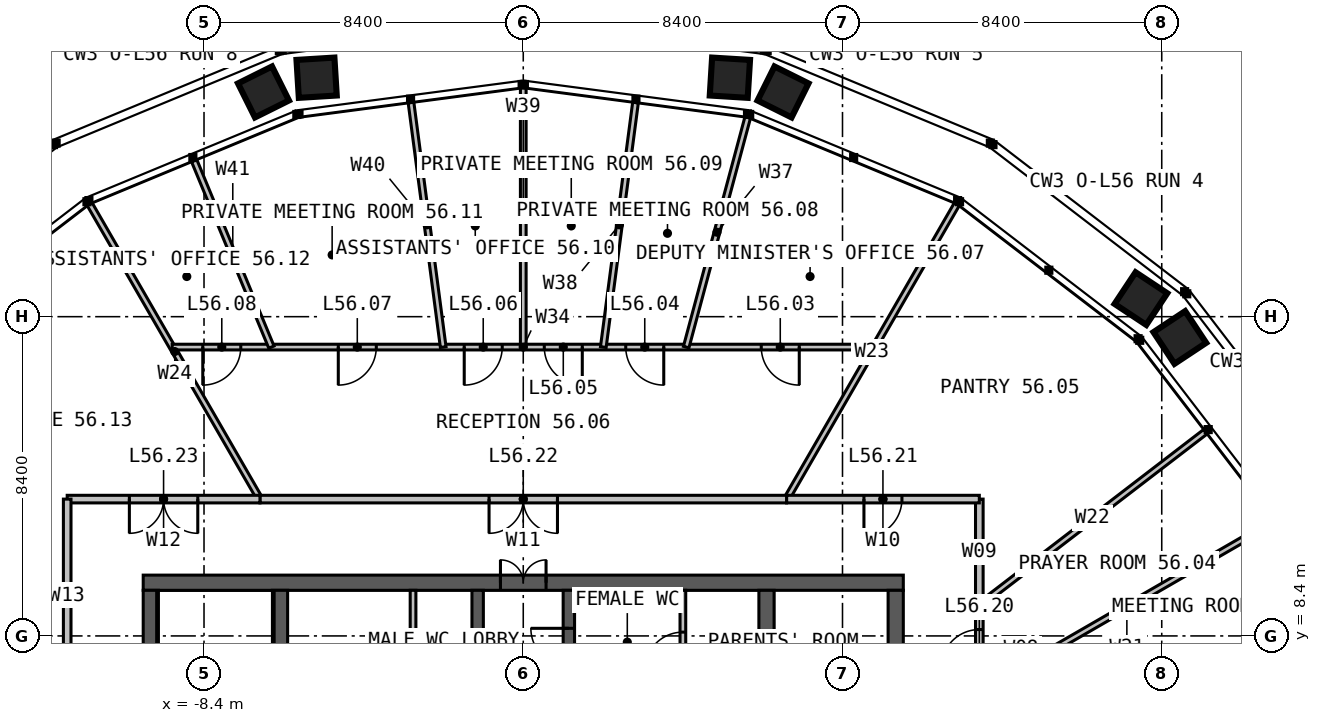
"""IFC4 building model, lengths in metres.
Left out: names, types, materials, properties, quantities, classifications, styles, units other than length and angle.
Written with IfcOpenShell. Run it as: python <this file> out.ifc"""

import sys

from ifc_helpers import new_model, si_unit, direction, frame, frame_2d, origin, place, context, subcontext, project, spatial, rectangle, extrude, element, fill, save


model = new_model("IFC4")
c1 = context("Model", 3, precision=1e-05, world=origin(), true_north=direction((0.0, 1.0)))
c2 = subcontext(c1, "Body", "Model", "MODEL_VIEW")
j1 = project(units=[si_unit("LENGTHUNIT", "METRE"), si_unit("PLANEANGLEUNIT", "RADIAN")], contexts=[c1])
p1 = place(None, origin())
s1 = spatial("IfcSite", under=j1, at=p1, CompositionType="ELEMENT")
p2 = place(p1, origin())
s2 = spatial("IfcBuilding", under=s1, at=p2, CompositionType="ELEMENT")
p3 = place(p2, frame((0.0, 0.0, 232.0)))
s3 = spatial("IfcBuildingStorey", under=s2, at=p3, CompositionType="ELEMENT", Elevation=232.0)
p4 = place(p3, frame((-10.0, 9.8, 0.0), z_axis=(0.0, 0.0, 1.0), x_axis=(1.0, 0.0, 0.0)))
e1 = element("IfcWall", 1, at=p4, inside=s3, PredefinedType="SOLIDWALL", context=c2, shape_type="SweptSolid", body=[
    extrude(rectangle(XDim=20.0, YDim=0.4, at=frame_2d((10.0, 0.0))), origin(), (0.0, 0.0, 1.0), 4.0),
])
p5 = place(p4, frame((9.4, 0.0, 0.0)))
e2 = element("IfcOpeningElement", 2, at=p5, cuts=e1, PredefinedType="OPENING", context=c2, shape_type="SweptSolid", body=[
    extrude(rectangle(XDim=1.2, YDim=2.2, at=frame_2d((0.6, 1.1))), frame((0.0, 0.21, 0.0), z_axis=(0.0, -1.0, 0.0), x_axis=(1.0, 0.0, 0.0)), (0.0, 0.0, 1.0), 0.42),
])
for number, where, z_axis, x_axis in (
    (3, (9.8, -9.6, 0.0), (0.0, 0.0, 1.0), (0.0, 1.0, 0.0)),
    (4, (-9.8, 9.6, 0.0), (0.0, 0.0, 1.0), (0.0, -1.0, 0.0)),
):
    element("IfcWall", number, at=place(p3, frame(where, z_axis=z_axis, x_axis=x_axis)), inside=s3, PredefinedType="SOLIDWALL", context=c2, shape_type="SweptSolid", body=[
        extrude(rectangle(XDim=19.2, YDim=0.4, at=frame_2d((9.6, 0.0))), origin(), (0.0, 0.0, 1.0), 4.0),
    ])
p6 = place(p3, frame((-6.4, -9.6, 0.0), z_axis=(0.0, 0.0, 1.0), x_axis=(0.0, 1.0, 0.0)))
e5 = element("IfcWall", 5, at=p6, inside=s3, PredefinedType="SOLIDWALL", context=c2, shape_type="SweptSolid", body=[
    extrude(rectangle(XDim=19.2, YDim=0.4, at=frame_2d((9.6, 0.0))), origin(), (0.0, 0.0, 1.0), 4.0),
])
p7 = place(p6, frame((9.1, 0.0, 0.0)))
e6 = element("IfcOpeningElement", 6, at=p7, cuts=e5, PredefinedType="OPENING", context=c2, shape_type="SweptSolid", body=[
    extrude(rectangle(XDim=1.0, YDim=2.2, at=frame_2d((0.5, 1.1))), frame((0.0, 0.21, 0.0), z_axis=(0.0, -1.0, 0.0), x_axis=(1.0, 0.0, 0.0)), (0.0, 0.0, 1.0), 0.42),
])
p8 = place(p3, frame((6.4, 9.6, 0.0), z_axis=(0.0, 0.0, 1.0), x_axis=(0.0, -1.0, 0.0)))
e7 = element("IfcWall", 7, at=p8, inside=s3, PredefinedType="SOLIDWALL", context=c2, shape_type="SweptSolid", body=[
    extrude(rectangle(XDim=19.2, YDim=0.4, at=frame_2d((9.6, 0.0))), origin(), (0.0, 0.0, 1.0), 4.0),
])
p9 = place(p8, frame((9.1, 0.0, 0.0)))
e8 = element("IfcOpeningElement", 8, at=p9, cuts=e7, PredefinedType="OPENING", context=c2, shape_type="SweptSolid", body=[
    extrude(rectangle(XDim=1.0, YDim=2.2, at=frame_2d((0.5, 1.1))), frame((0.0, 0.21, 0.0), z_axis=(0.0, -1.0, 0.0), x_axis=(1.0, 0.0, 0.0)), (0.0, 0.0, 1.0), 0.42),
])
p10 = place(p3, frame((-1.2, 1.45, 0.0), z_axis=(0.0, 0.0, 1.0), x_axis=(0.0, 1.0, 0.0)))
e9 = element("IfcWall", 9, at=p10, inside=s3, PredefinedType="SOLIDWALL", context=c2, shape_type="SweptSolid", body=[
    extrude(rectangle(XDim=8.15, YDim=0.3, at=frame_2d((4.075, 0.0))), origin(), (0.0, 0.0, 1.0), 4.0),
])
p11 = place(p10, frame((5.05, 0.0, 0.0)))
e10 = element("IfcOpeningElement", 10, at=p11, cuts=e9, PredefinedType="OPENING", context=c2, shape_type="SweptSolid", body=[
    extrude(rectangle(XDim=1.0, YDim=2.2, at=frame_2d((0.5, 1.1))), frame((0.0, 0.16, 0.0), z_axis=(0.0, -1.0, 0.0), x_axis=(1.0, 0.0, 0.0)), (0.0, 0.0, 1.0), 0.32),
])
p12 = place(p3, frame((1.2, 1.45, 0.0), z_axis=(0.0, 0.0, 1.0), x_axis=(0.0, 1.0, 0.0)))
e11 = element("IfcWall", 11, at=p12, inside=s3, PredefinedType="SOLIDWALL", context=c2, shape_type="SweptSolid", body=[
    extrude(rectangle(XDim=8.15, YDim=0.3, at=frame_2d((4.075, 0.0))), origin(), (0.0, 0.0, 1.0), 4.0),
])
p13 = place(p12, frame((3.8, 0.0, 0.0)))
e12 = element("IfcOpeningElement", 12, at=p13, cuts=e11, PredefinedType="OPENING", context=c2, shape_type="SweptSolid", body=[
    extrude(rectangle(XDim=1.0, YDim=2.2, at=frame_2d((0.5, 1.1))), frame((0.0, 0.16, 0.0), z_axis=(0.0, -1.0, 0.0), x_axis=(1.0, 0.0, 0.0)), (0.0, 0.0, 1.0), 0.32),
])
p14 = place(p12, frame((6.15, 0.0, 0.0)))
e13 = element("IfcOpeningElement", 13, at=p14, cuts=e11, PredefinedType="OPENING", context=c2, shape_type="SweptSolid", body=[
    extrude(rectangle(XDim=1.0, YDim=2.2, at=frame_2d((0.5, 1.1))), frame((0.0, 0.16, 0.0), z_axis=(0.0, -1.0, 0.0), x_axis=(1.0, 0.0, 0.0)), (0.0, 0.0, 1.0), 0.32),
])
p15 = place(p3, frame((4.2, 6.875, 0.0), z_axis=(0.0, 0.0, 1.0), x_axis=(0.0, 1.0, 0.0)))
e14 = element("IfcWall", 14, at=p15, inside=s3, PredefinedType="PARTITIONING", context=c2, shape_type="SweptSolid", body=[
    extrude(rectangle(XDim=2.725, YDim=0.15, at=frame_2d((1.363, 0.0))), origin(), (0.0, 0.0, 1.0), 3.75),
])
p16 = place(p15, frame((0.625, 0.0, 0.0)))
e15 = element("IfcOpeningElement", 15, at=p16, cuts=e14, PredefinedType="OPENING", context=c2, shape_type="SweptSolid", body=[
    extrude(rectangle(XDim=1.0, YDim=2.2, at=frame_2d((0.5, 1.1))), frame((0.0, 0.085, 0.0), z_axis=(0.0, -1.0, 0.0), x_axis=(1.0, 0.0, 0.0)), (0.0, 0.0, 1.0), 0.17),
])
p17 = place(p3, frame((-2.9, 4.75, 0.0), z_axis=(0.0, 0.0, 1.0), x_axis=(0.0, 1.0, 0.0)))
e16 = element("IfcWall", 16, at=p17, inside=s3, PredefinedType="PARTITIONING", context=c2, shape_type="SweptSolid", body=[
    extrude(rectangle(XDim=4.85, YDim=0.15, at=frame_2d((2.425, 0.0))), origin(), (0.0, 0.0, 1.0), 3.75),
])
p18 = place(p17, frame((0.35, 0.0, 0.0)))
e17 = element("IfcOpeningElement", 17, at=p18, cuts=e16, PredefinedType="OPENING", context=c2, shape_type="SweptSolid", body=[
    extrude(rectangle(XDim=1.0, YDim=2.2, at=frame_2d((0.5, 1.1))), frame((0.0, 0.085, 0.0), z_axis=(0.0, -1.0, 0.0), x_axis=(1.0, 0.0, 0.0)), (0.0, 0.0, 1.0), 0.17),
])
p19 = place(p3, frame((12.0, 6.928, 0.0), z_axis=(0.0, 0.0, 1.0), x_axis=(0.866025969295, 0.499999020506, 0.0)))
e18 = element("IfcWall", 18, at=p19, inside=s3, PredefinedType="PARTITIONING", context=c2, shape_type="SweptSolid", body=[
    extrude(rectangle(XDim=8.966, YDim=0.15, at=frame_2d((4.483, 0.0))), origin(), (0.0, 0.0, 1.0), 2.79),
])
p20 = place(p3, frame((12.0, 9.208, 0.0), z_axis=(0.0, 0.0, 1.0), x_axis=(0.793359040843, 0.608753999833, 0.0)))
e19 = element("IfcWall", 19, at=p20, inside=s3, PredefinedType="PARTITIONING", context=c2, shape_type="SweptSolid", body=[
    extrude(rectangle(XDim=7.501, YDim=0.15, at=frame_2d((3.75, 0.0))), origin(), (0.0, 0.0, 1.0), 2.79),
])
for number, where, z_axis, x_axis in (
    (20, (6.928, 12.0, 0.0), (0.0, 0.0, 1.0), (0.5, 0.866, 0.0)),
    (21, (-6.928, 12.0, 0.0), (0.0, 0.0, 1.0), (-0.5, 0.866, 0.0)),
    (22, (-12.0, 6.928, 0.0), (0.0, 0.0, 1.0), (-0.866, 0.5, 0.0)),
):
    element("IfcWall", number, at=place(p3, frame(where, z_axis=z_axis, x_axis=x_axis)), inside=s3, PredefinedType="PARTITIONING", context=c2, shape_type="SweptSolid", body=[
        extrude(rectangle(XDim=8.966, YDim=0.15, at=frame_2d((4.483, 0.0))), origin(), (0.0, 0.0, 1.0), 2.79),
    ])
p21 = place(p3, frame((12.0, 6.928, 0.0), z_axis=(0.0, 0.0, 1.0), x_axis=(0.0, 1.0, 0.0)))
e23 = element("IfcWall", 23, at=p21, inside=s3, PredefinedType="PARTITIONING", context=c2, shape_type="SweptSolid", body=[
    extrude(rectangle(XDim=2.28, YDim=0.2, at=frame_2d((1.14, 0.0))), origin(), (0.0, 0.0, 1.0), 3.8),
])
p22 = place(p21, frame((0.64, 0.0, 0.0)))
e24 = element("IfcOpeningElement", 24, at=p22, cuts=e23, PredefinedType="OPENING", context=c2, shape_type="SweptSolid", body=[
    extrude(rectangle(XDim=1.0, YDim=2.2, at=frame_2d((0.5, 1.1))), frame((0.0, 0.11, 0.0), z_axis=(0.0, -1.0, 0.0), x_axis=(1.0, 0.0, 0.0)), (0.0, 0.0, 1.0), 0.22),
])
p23 = place(p3, frame((12.0, 9.208, 0.0), z_axis=(0.0, 0.0, 1.0), x_axis=(0.0, 1.0, 0.0)))
e25 = element("IfcWall", 25, at=p23, inside=s3, PredefinedType="PARTITIONING", context=c2, shape_type="SweptSolid", body=[
    extrude(rectangle(XDim=2.792, YDim=0.2, at=frame_2d((1.396, 0.0))), origin(), (0.0, 0.0, 1.0), 3.8),
])
p24 = place(p3, frame((12.0, 12.0, 0.0), z_axis=(0.0, 0.0, 1.0), x_axis=(-1.0, 0.0, 0.0)))
e26 = element("IfcWall", 26, at=p24, inside=s3, PredefinedType="PARTITIONING", context=c2, shape_type="SweptSolid", body=[
    extrude(rectangle(XDim=5.072, YDim=0.2, at=frame_2d((2.536, 0.0))), origin(), (0.0, 0.0, 1.0), 3.8),
])
p25 = place(p24, frame((2.036, 0.0, 0.0)))
e27 = element("IfcOpeningElement", 27, at=p25, cuts=e26, PredefinedType="OPENING", context=c2, shape_type="SweptSolid", body=[
    extrude(rectangle(XDim=1.0, YDim=2.2, at=frame_2d((0.5, 1.1))), frame((0.0, 0.11, 0.0), z_axis=(0.0, -1.0, 0.0), x_axis=(1.0, 0.0, 0.0)), (0.0, 0.0, 1.0), 0.22),
])
p26 = place(p3, frame((9.238, 16.0, 0.0), z_axis=(0.0, 0.0, 1.0), x_axis=(-1.0, 0.0, 0.0)))
e28 = element("IfcWall", 28, at=p26, inside=s3, PredefinedType="PARTITIONING", context=c2, shape_type="SweptSolid", body=[
    extrude(rectangle(XDim=18.475, YDim=0.15, at=frame_2d((9.238, 0.0))), origin(), (0.0, 0.0, 1.0), 2.79),
])
p27 = place(p26, frame((1.975, 0.0, 0.0)))
e29 = element("IfcOpeningElement", 29, at=p27, cuts=e28, PredefinedType="OPENING", context=c2, shape_type="SweptSolid", body=[
    extrude(rectangle(XDim=1.0, YDim=2.2, at=frame_2d((0.5, 1.1))), frame((0.0, 0.085, 0.0), z_axis=(0.0, -1.0, 0.0), x_axis=(1.0, 0.0, 0.0)), (0.0, 0.0, 1.0), 0.17),
])
p28 = place(p26, frame((5.541, 0.0, 0.0)))
e30 = element("IfcOpeningElement", 30, at=p28, cuts=e28, PredefinedType="OPENING", context=c2, shape_type="SweptSolid", body=[
    extrude(rectangle(XDim=1.0, YDim=2.2, at=frame_2d((0.5, 1.1))), frame((0.0, 0.085, 0.0), z_axis=(0.0, -1.0, 0.0), x_axis=(1.0, 0.0, 0.0)), (0.0, 0.0, 1.0), 0.17),
])
p29 = place(p26, frame((7.684, 0.0, 0.0)))
e31 = element("IfcOpeningElement", 31, at=p29, cuts=e28, PredefinedType="OPENING", context=c2, shape_type="SweptSolid", body=[
    extrude(rectangle(XDim=1.0, YDim=2.2, at=frame_2d((0.5, 1.1))), frame((0.0, 0.085, 0.0), z_axis=(0.0, -1.0, 0.0), x_axis=(1.0, 0.0, 0.0)), (0.0, 0.0, 1.0), 0.17),
])
p30 = place(p26, frame((9.791, 0.0, 0.0)))
e32 = element("IfcOpeningElement", 32, at=p30, cuts=e28, PredefinedType="OPENING", context=c2, shape_type="SweptSolid", body=[
    extrude(rectangle(XDim=1.0, YDim=2.2, at=frame_2d((0.5, 1.1))), frame((0.0, 0.085, 0.0), z_axis=(0.0, -1.0, 0.0), x_axis=(1.0, 0.0, 0.0)), (0.0, 0.0, 1.0), 0.17),
])
p31 = place(p26, frame((13.104, 0.0, 0.0)))
e33 = element("IfcOpeningElement", 33, at=p31, cuts=e28, PredefinedType="OPENING", context=c2, shape_type="SweptSolid", body=[
    extrude(rectangle(XDim=1.0, YDim=2.2, at=frame_2d((0.5, 1.1))), frame((0.0, 0.085, 0.0), z_axis=(0.0, -1.0, 0.0), x_axis=(1.0, 0.0, 0.0)), (0.0, 0.0, 1.0), 0.17),
])
p32 = place(p26, frame((16.67, 0.0, 0.0)))
e34 = element("IfcOpeningElement", 34, at=p32, cuts=e28, PredefinedType="OPENING", context=c2, shape_type="SweptSolid", body=[
    extrude(rectangle(XDim=1.0, YDim=2.2, at=frame_2d((0.5, 1.1))), frame((0.0, 0.085, 0.0), z_axis=(0.0, -1.0, 0.0), x_axis=(1.0, 0.0, 0.0)), (0.0, 0.0, 1.0), 0.17),
])
p33 = place(p3, frame((4.287, 16.0, 0.0), z_axis=(0.0, 0.0, 1.0), x_axis=(0.258813437513, 0.965927328821, 0.0)))
e35 = element("IfcWall", 35, at=p33, inside=s3, PredefinedType="PARTITIONING", context=c2, shape_type="SweptSolid", body=[
    extrude(rectangle(XDim=6.258, YDim=0.15, at=frame_2d((3.129, 0.0))), origin(), (0.0, 0.0, 1.0), 2.79),
])
p34 = place(p3, frame((2.106, 16.0, 0.0), z_axis=(0.0, 0.0, 1.0), x_axis=(0.130519721425, 0.991445713249, 0.0)))
e36 = element("IfcWall", 36, at=p34, inside=s3, PredefinedType="PARTITIONING", context=c2, shape_type="SweptSolid", body=[
    extrude(rectangle(XDim=6.489, YDim=0.15, at=frame_2d((3.244, 0.0))), origin(), (0.0, 0.0, 1.0), 2.79),
])
p35 = place(p3, frame((0.0, 16.0, 0.0), z_axis=(0.0, 0.0, 1.0), x_axis=(0.0, 1.0, 0.0)))
e37 = element("IfcWall", 37, at=p35, inside=s3, PredefinedType="PARTITIONING", context=c2, shape_type="SweptSolid", body=[
    extrude(rectangle(XDim=6.822, YDim=0.15, at=frame_2d((3.411, 0.0))), origin(), (0.0, 0.0, 1.0), 2.79),
])
p36 = place(p3, frame((-2.106, 16.0, 0.0), z_axis=(0.0, 0.0, 1.0), x_axis=(-0.130519721425, 0.991445713249, 0.0)))
e38 = element("IfcWall", 38, at=p36, inside=s3, PredefinedType="PARTITIONING", context=c2, shape_type="SweptSolid", body=[
    extrude(rectangle(XDim=6.489, YDim=0.15, at=frame_2d((3.244, 0.0))), origin(), (0.0, 0.0, 1.0), 2.79),
])
p37 = place(p3, frame((-6.627, 16.0, 0.0), z_axis=(0.0, 0.0, 1.0), x_axis=(-0.382678083764, 0.923881747956, 0.0)))
e39 = element("IfcWall", 39, at=p37, inside=s3, PredefinedType="PARTITIONING", context=c2, shape_type="SweptSolid", body=[
    extrude(rectangle(XDim=5.309, YDim=0.15, at=frame_2d((2.654, 0.0))), origin(), (0.0, 0.0, 1.0), 2.79),
])
p38 = place(p3, frame((6.928, 12.0, 0.0), z_axis=(0.0, 0.0, 1.0), x_axis=(-1.0, 0.0, 0.0)))
e40 = element("IfcWall", 40, at=p38, inside=s3, PredefinedType="PARTITIONING", context=c2, shape_type="SweptSolid", body=[
    extrude(rectangle(XDim=13.856, YDim=0.2, at=frame_2d((6.928, 0.0))), origin(), (0.0, 0.0, 1.0), 3.8),
])
p39 = place(p38, frame((6.028, 0.0, 0.0)))
e41 = element("IfcOpeningElement", 41, at=p39, cuts=e40, PredefinedType="OPENING", context=c2, shape_type="SweptSolid", body=[
    extrude(rectangle(XDim=1.8, YDim=2.2, at=frame_2d((0.9, 1.1))), frame((0.0, 0.11, 0.0), z_axis=(0.0, -1.0, 0.0), x_axis=(1.0, 0.0, 0.0)), (0.0, 0.0, 1.0), 0.22),
])
p40 = place(p3, frame((-6.928, 12.0, 0.0), z_axis=(0.0, 0.0, 1.0), x_axis=(-1.0, 0.0, 0.0)))
e42 = element("IfcWall", 42, at=p40, inside=s3, PredefinedType="PARTITIONING", context=c2, shape_type="SweptSolid", body=[
    extrude(rectangle(XDim=5.072, YDim=0.2, at=frame_2d((2.536, 0.0))), origin(), (0.0, 0.0, 1.0), 3.8),
])
p41 = place(p40, frame((1.636, 0.0, 0.0)))
e43 = element("IfcOpeningElement", 43, at=p41, cuts=e42, PredefinedType="OPENING", context=c2, shape_type="SweptSolid", body=[
    extrude(rectangle(XDim=1.8, YDim=2.2, at=frame_2d((0.9, 1.1))), frame((0.0, 0.11, 0.0), z_axis=(0.0, -1.0, 0.0), x_axis=(1.0, 0.0, 0.0)), (0.0, 0.0, 1.0), 0.22),
])
p42 = place(p3, frame((-12.0, 12.0, 0.0), z_axis=(0.0, 0.0, 1.0), x_axis=(0.0, -1.0, 0.0)))
e44 = element("IfcWall", 44, at=p42, inside=s3, PredefinedType="PARTITIONING", context=c2, shape_type="SweptSolid", body=[
    extrude(rectangle(XDim=5.072, YDim=0.2, at=frame_2d((2.536, 0.0))), origin(), (0.0, 0.0, 1.0), 3.8),
])
p43 = place(p5, origin())
e45 = element("IfcDoor", 45, at=p43, inside=s3, OperationType="DOUBLE_DOOR_SINGLE_SWING", PredefinedType="DOOR", context=c2, shape_type="SweptSolid", body=[
    extrude(rectangle(XDim=1.2, YDim=2.2, at=frame_2d((0.6, 1.1))), frame((0.0, 0.025, 0.0), z_axis=(0.0, -1.0, 0.0), x_axis=(1.0, 0.0, 0.0)), (0.0, 0.0, 1.0), 0.05),
])
fill(e2, e45)
p44 = place(p14, origin())
e46 = element("IfcDoor", 46, at=p44, inside=s3, OperationType="SINGLE_SWING_RIGHT", PredefinedType="DOOR", context=c2, shape_type="SweptSolid", body=[
    extrude(rectangle(XDim=1.0, YDim=2.2, at=frame_2d((0.5, 1.1))), frame((0.0, 0.025, 0.0), z_axis=(0.0, -1.0, 0.0), x_axis=(1.0, 0.0, 0.0)), (0.0, 0.0, 1.0), 0.05),
])
fill(e13, e46)
p45 = place(p16, origin())
e47 = element("IfcDoor", 47, at=p45, inside=s3, OperationType="SINGLE_SWING_LEFT", PredefinedType="DOOR", context=c2, shape_type="SweptSolid", body=[
    extrude(rectangle(XDim=1.0, YDim=2.2, at=frame_2d((0.5, 1.1))), frame((0.0, 0.025, 0.0), z_axis=(0.0, -1.0, 0.0), x_axis=(1.0, 0.0, 0.0)), (0.0, 0.0, 1.0), 0.05),
])
fill(e15, e47)
p46 = place(p22, origin())
e48 = element("IfcDoor", 48, at=p46, inside=s3, OperationType="SINGLE_SWING_LEFT", PredefinedType="DOOR", context=c2, shape_type="SweptSolid", body=[
    extrude(rectangle(XDim=1.0, YDim=2.2, at=frame_2d((0.5, 1.1))), frame((0.0, 0.025, 0.0), z_axis=(0.0, -1.0, 0.0), x_axis=(1.0, 0.0, 0.0)), (0.0, 0.0, 1.0), 0.05),
])
fill(e24, e48)
p47 = place(p25, origin())
e49 = element("IfcDoor", 49, at=p47, inside=s3, OperationType="SINGLE_SWING_RIGHT", PredefinedType="DOOR", context=c2, shape_type="SweptSolid", body=[
    extrude(rectangle(XDim=1.0, YDim=2.2, at=frame_2d((0.5, 1.1))), frame((0.0, 0.025, 0.0), z_axis=(0.0, -1.0, 0.0), x_axis=(1.0, 0.0, 0.0)), (0.0, 0.0, 1.0), 0.05),
])
fill(e27, e49)
p48 = place(p27, origin())
e50 = element("IfcDoor", 50, at=p48, inside=s3, OperationType="SINGLE_SWING_LEFT", PredefinedType="DOOR", context=c2, shape_type="SweptSolid", body=[
    extrude(rectangle(XDim=1.0, YDim=2.2, at=frame_2d((0.5, 1.1))), frame((0.0, 0.025, 0.0), z_axis=(0.0, -1.0, 0.0), x_axis=(1.0, 0.0, 0.0)), (0.0, 0.0, 1.0), 0.05),
])
fill(e29, e50)
p49 = place(p28, origin())
e51 = element("IfcDoor", 51, at=p49, inside=s3, OperationType="SINGLE_SWING_LEFT", PredefinedType="DOOR", context=c2, shape_type="SweptSolid", body=[
    extrude(rectangle(XDim=1.0, YDim=2.2, at=frame_2d((0.5, 1.1))), frame((0.0, 0.025, 0.0), z_axis=(0.0, -1.0, 0.0), x_axis=(1.0, 0.0, 0.0)), (0.0, 0.0, 1.0), 0.05),
])
fill(e30, e51)
p50 = place(p29, origin())
e52 = element("IfcDoor", 52, at=p50, inside=s3, OperationType="SINGLE_SWING_LEFT", PredefinedType="DOOR", context=c2, shape_type="SweptSolid", body=[
    extrude(rectangle(XDim=1.0, YDim=2.2, at=frame_2d((0.5, 1.1))), frame((0.0, 0.025, 0.0), z_axis=(0.0, -1.0, 0.0), x_axis=(1.0, 0.0, 0.0)), (0.0, 0.0, 1.0), 0.05),
])
fill(e31, e52)
p51 = place(p30, origin())
e53 = element("IfcDoor", 53, at=p51, inside=s3, OperationType="SINGLE_SWING_RIGHT", PredefinedType="DOOR", context=c2, shape_type="SweptSolid", body=[
    extrude(rectangle(XDim=1.0, YDim=2.2, at=frame_2d((0.5, 1.1))), frame((0.0, 0.025, 0.0), z_axis=(0.0, -1.0, 0.0), x_axis=(1.0, 0.0, 0.0)), (0.0, 0.0, 1.0), 0.05),
])
fill(e32, e53)
p52 = place(p31, origin())
e54 = element("IfcDoor", 54, at=p52, inside=s3, OperationType="SINGLE_SWING_RIGHT", PredefinedType="DOOR", context=c2, shape_type="SweptSolid", body=[
    extrude(rectangle(XDim=1.0, YDim=2.2, at=frame_2d((0.5, 1.1))), frame((0.0, 0.025, 0.0), z_axis=(0.0, -1.0, 0.0), x_axis=(1.0, 0.0, 0.0)), (0.0, 0.0, 1.0), 0.05),
])
fill(e33, e54)
p53 = place(p32, origin())
e55 = element("IfcDoor", 55, at=p53, inside=s3, OperationType="SINGLE_SWING_RIGHT", PredefinedType="DOOR", context=c2, shape_type="SweptSolid", body=[
    extrude(rectangle(XDim=1.0, YDim=2.2, at=frame_2d((0.5, 1.1))), frame((0.0, 0.025, 0.0), z_axis=(0.0, -1.0, 0.0), x_axis=(1.0, 0.0, 0.0)), (0.0, 0.0, 1.0), 0.05),
])
fill(e34, e55)
p54 = place(p39, origin())
e56 = element("IfcDoor", 56, at=p54, inside=s3, OperationType="DOUBLE_DOOR_SINGLE_SWING", PredefinedType="DOOR", context=c2, shape_type="SweptSolid", body=[
    extrude(rectangle(XDim=1.8, YDim=2.2, at=frame_2d((0.9, 1.1))), frame((0.0, 0.025, 0.0), z_axis=(0.0, -1.0, 0.0), x_axis=(1.0, 0.0, 0.0)), (0.0, 0.0, 1.0), 0.05),
])
fill(e41, e56)
p55 = place(p41, origin())
e57 = element("IfcDoor", 57, at=p55, inside=s3, OperationType="DOUBLE_DOOR_SINGLE_SWING", PredefinedType="DOOR", context=c2, shape_type="SweptSolid", body=[
    extrude(rectangle(XDim=1.8, YDim=2.2, at=frame_2d((0.9, 1.1))), frame((0.0, 0.025, 0.0), z_axis=(0.0, -1.0, 0.0), x_axis=(1.0, 0.0, 0.0)), (0.0, 0.0, 1.0), 0.05),
])
fill(e43, e57)
save(model, sys.argv[1])
